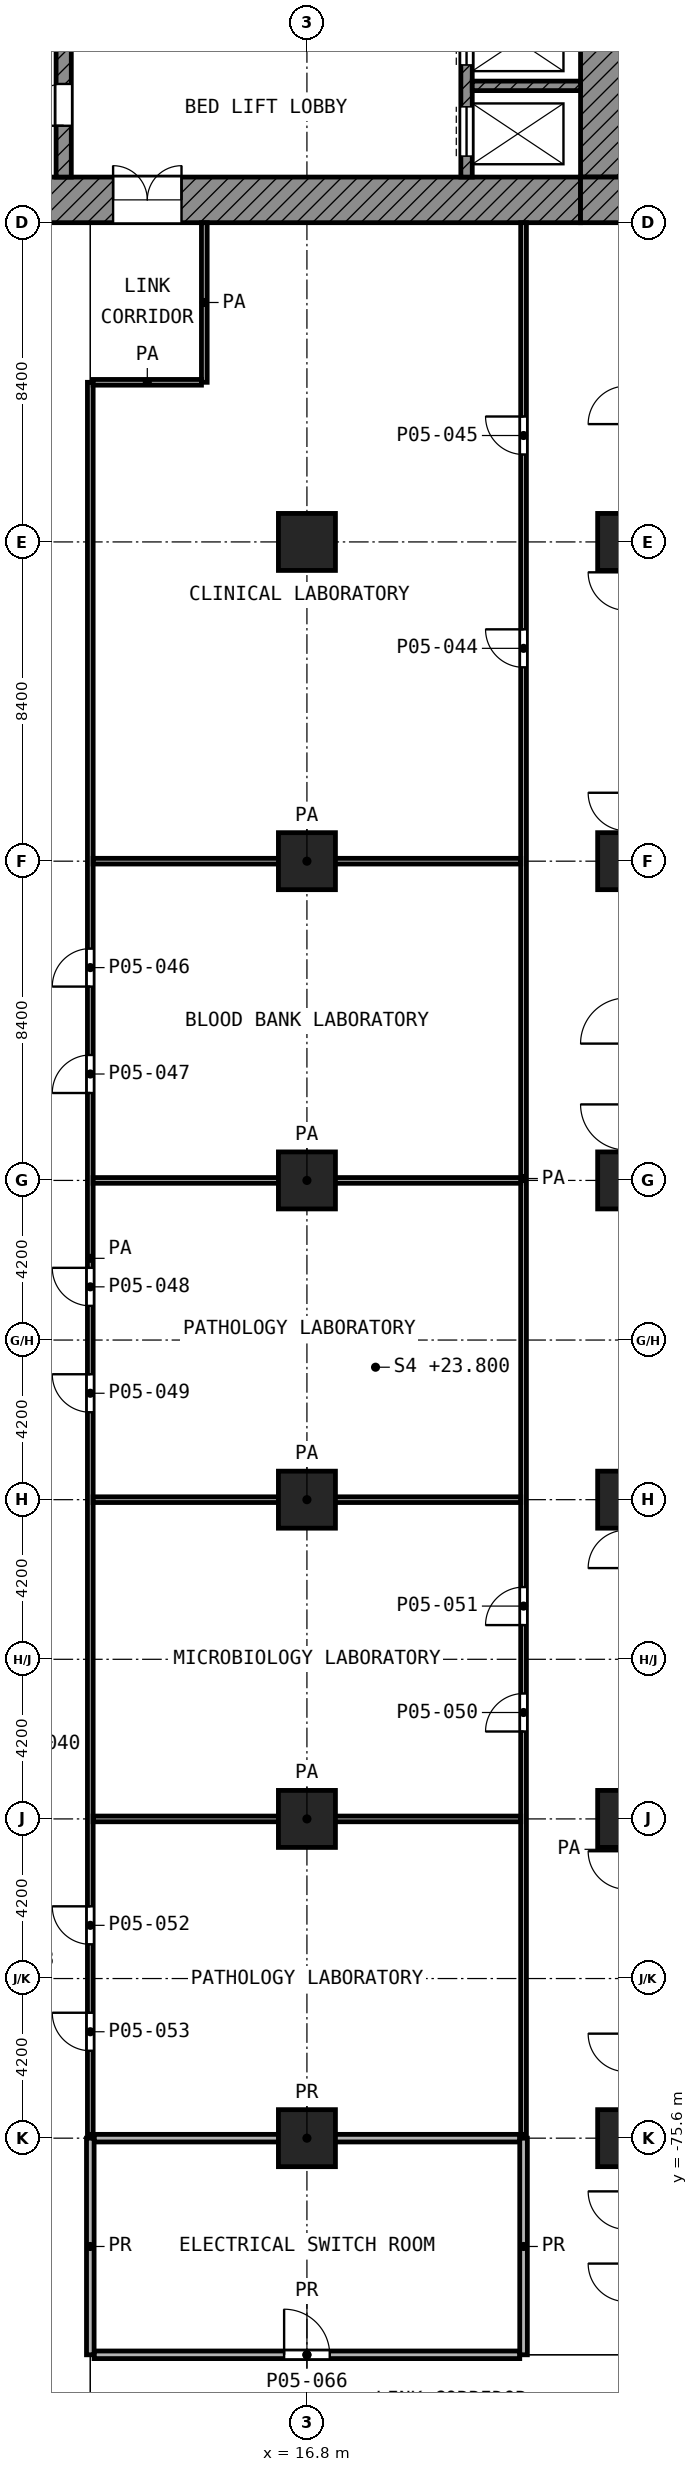
"""IFC4 building model, lengths in metres.
Left out: names, types, materials, properties, quantities, classifications, styles, units other than length and angle.
Written with IfcOpenShell. Run it as: python <this file> out.ifc"""

import sys

from ifc_helpers import new_model, si_unit, direction, frame, frame_2d, origin, origin_2d, place, context, subcontext, project, spatial, rectangle, extrude, element, fill, save


model = new_model("IFC4")
c1 = context("Model", 3, precision=1e-05, world=origin(), true_north=direction((0.0, 1.0)))
c2 = subcontext(c1, "Body", "Model", "MODEL_VIEW")
j1 = project(units=[si_unit("LENGTHUNIT", "METRE"), si_unit("PLANEANGLEUNIT", "RADIAN")], contexts=[c1])
p1 = place(None, origin())
s1 = spatial("IfcSite", under=j1, at=p1, CompositionType="ELEMENT")
p2 = place(p1, origin())
s2 = spatial("IfcBuilding", under=s1, at=p2, CompositionType="ELEMENT")
p3 = place(p2, frame((0.0, 0.0, 23.8)))
s3 = spatial("IfcBuildingStorey", under=s2, at=p3, CompositionType="ELEMENT", Elevation=23.8)
for number, where, z_axis, x_axis in (
    (1, (16.8, -33.6, 0.0), (0.0, 0.0, 1.0), (1.0, 0.0, 0.0)),
    (2, (25.2, -33.6, 0.0), (0.0, 0.0, 1.0), (1.0, 0.0, 0.0)),
    (3, (16.8, -42.0, 0.0), (0.0, 0.0, 1.0), (1.0, 0.0, 0.0)),
    (4, (25.2, -42.0, 0.0), (0.0, 0.0, 1.0), (1.0, 0.0, 0.0)),
    (5, (16.8, -50.4, 0.0), (0.0, 0.0, 1.0), (1.0, 0.0, 0.0)),
    (6, (25.2, -50.4, 0.0), (0.0, 0.0, 1.0), (1.0, 0.0, 0.0)),
    (7, (16.8, -58.8, 0.0), (0.0, 0.0, 1.0), (1.0, 0.0, 0.0)),
    (8, (25.2, -58.8, 0.0), (0.0, 0.0, 1.0), (1.0, 0.0, 0.0)),
    (9, (16.8, -67.2, 0.0), (0.0, 0.0, 1.0), (1.0, 0.0, 0.0)),
    (10, (25.2, -67.2, 0.0), (0.0, 0.0, 1.0), (1.0, 0.0, 0.0)),
    (11, (16.8, -75.6, 0.0), (0.0, 0.0, 1.0), (1.0, 0.0, 0.0)),
    (12, (25.2, -75.6, 0.0), (0.0, 0.0, 1.0), (1.0, 0.0, 0.0)),
):
    element("IfcColumn", number, at=place(p3, frame(where, z_axis=z_axis, x_axis=x_axis)), inside=s3, PredefinedType="COLUMN", context=c2, shape_type="SweptSolid", body=[
        extrude(rectangle(XDim=1.5, YDim=1.5, at=origin_2d()), origin(), (0.0, 0.0, 1.0), 5.2),
    ])
p4 = place(p3, frame((24.6, -24.0, 0.0), z_axis=(0.0, 0.0, 1.0), x_axis=(0.0, 1.0, 0.0)))
e13 = element("IfcWall", 13, at=p4, inside=s3, PredefinedType="SHEAR", context=c2, shape_type="SweptSolid", body=[
    extrude(rectangle(XDim=18.6, YDim=1.2, at=frame_2d((9.3, 0.0))), origin(), (0.0, 0.0, 1.0), 4.85),
])
p5 = place(p4, frame((10.5, 0.0, 0.0)))
e14 = element("IfcOpeningElement", 14, at=p5, cuts=e13, PredefinedType="OPENING", context=c2, shape_type="SweptSolid", body=[
    extrude(rectangle(XDim=1.8, YDim=2.1, at=frame_2d((0.9, 1.05))), frame((0.0, 0.61, 0.0), z_axis=(0.0, -1.0, 0.0), x_axis=(1.0, 0.0, 0.0)), (0.0, 0.0, 1.0), 1.22),
])
p6 = place(p3, frame((5.4, -24.6, 0.0), z_axis=(0.0, 0.0, 1.0), x_axis=(1.0, 0.0, 0.0)))
e15 = element("IfcWall", 15, at=p6, inside=s3, PredefinedType="SHEAR", context=c2, shape_type="SweptSolid", body=[
    extrude(rectangle(XDim=18.6, YDim=1.2, at=frame_2d((9.3, 0.0))), origin(), (0.0, 0.0, 1.0), 4.85),
])
p7 = place(p6, frame((6.3, 0.0, 0.0)))
e16 = element("IfcOpeningElement", 16, at=p7, cuts=e15, PredefinedType="OPENING", context=c2, shape_type="SweptSolid", body=[
    extrude(rectangle(XDim=1.8, YDim=2.1, at=frame_2d((0.9, 1.05))), frame((0.0, 0.61, 0.0), z_axis=(0.0, -1.0, 0.0), x_axis=(1.0, 0.0, 0.0)), (0.0, 0.0, 1.0), 1.22),
])
p8 = place(p3, frame((24.6, -25.2, 0.0), z_axis=(0.0, 0.0, 1.0), x_axis=(0.0, 1.0, 0.0)))
e17 = element("IfcWall", 17, at=p8, inside=s3, PredefinedType="SHEAR", context=c2, shape_type="SweptSolid", body=[
    extrude(rectangle(XDim=1.2, YDim=1.2, at=frame_2d((0.6, 0.0))), origin(), (0.0, 0.0, 1.0), 4.85),
])
p9 = place(p3, frame((10.4, -24.0, 0.0), z_axis=(0.0, 0.0, 1.0), x_axis=(0.0, 1.0, 0.0)))
e18 = element("IfcWall", 18, at=p9, inside=s3, PredefinedType="SHEAR", context=c2, shape_type="SweptSolid", body=[
    extrude(rectangle(XDim=3.65, YDim=0.4, at=frame_2d((1.825, 0.0))), origin(), (0.0, 0.0, 1.0), 4.85),
])
p10 = place(p9, frame((1.35, 0.0, 0.0)))
e19 = element("IfcOpeningElement", 19, at=p10, cuts=e18, PredefinedType="OPENING", context=c2, shape_type="SweptSolid", body=[
    extrude(rectangle(XDim=1.1, YDim=2.1, at=frame_2d((0.55, 1.05))), frame((0.0, 0.21, 0.0), z_axis=(0.0, -1.0, 0.0), x_axis=(1.0, 0.0, 0.0)), (0.0, 0.0, 1.0), 0.42),
])
p11 = place(p3, frame((21.0, -24.0, 0.0), z_axis=(0.0, 0.0, 1.0), x_axis=(0.0, 1.0, 0.0)))
e20 = element("IfcWall", 20, at=p11, inside=s3, PredefinedType="SHEAR", context=c2, shape_type="SweptSolid", body=[
    extrude(rectangle(XDim=4.95, YDim=0.3, at=frame_2d((2.475, 0.0))), origin(), (0.0, 0.0, 1.0), 4.85),
])
p12 = place(p11, frame((2.95, 0.0, 0.0)))
e21 = element("IfcOpeningElement", 21, at=p12, cuts=e20, PredefinedType="OPENING", context=c2, shape_type="SweptSolid", body=[
    extrude(rectangle(XDim=1.3, YDim=2.1, at=frame_2d((0.65, 1.05))), frame((0.0, 0.16, 0.0), z_axis=(0.0, -1.0, 0.0), x_axis=(1.0, 0.0, 0.0)), (0.0, 0.0, 1.0), 0.32),
])
p13 = place(p11, frame((0.55, 0.0, 0.0)))
e22 = element("IfcOpeningElement", 22, at=p13, cuts=e20, PredefinedType="OPENING", context=c2, shape_type="SweptSolid", body=[
    extrude(rectangle(XDim=1.3, YDim=2.1, at=frame_2d((0.65, 1.05))), frame((0.0, 0.16, 0.0), z_axis=(0.0, -1.0, 0.0), x_axis=(1.0, 0.0, 0.0)), (0.0, 0.0, 1.0), 0.32),
])
p14 = place(p3, frame((21.15, -21.6, 0.0), z_axis=(0.0, 0.0, 1.0), x_axis=(1.0, 0.0, 0.0)))
e23 = element("IfcWall", 23, at=p14, inside=s3, PredefinedType="SHEAR", context=c2, shape_type="SweptSolid", body=[
    extrude(rectangle(XDim=2.85, YDim=0.25, at=frame_2d((1.425, 0.0))), origin(), (0.0, 0.0, 1.0), 4.85),
])
for number, where, z_axis, x_axis in (
    (24, (11.175, -67.2, 0.0), (0.0, 0.0, 1.0), (1.0, 0.0, 0.0)),
    (25, (11.175, -58.8, 0.0), (0.0, 0.0, 1.0), (1.0, 0.0, 0.0)),
    (26, (11.175, -50.4, 0.0), (0.0, 0.0, 1.0), (1.0, 0.0, 0.0)),
    (27, (11.175, -42.0, 0.0), (0.0, 0.0, 1.0), (1.0, 0.0, 0.0)),
):
    element("IfcWall", number, at=place(p3, frame(where, z_axis=z_axis, x_axis=x_axis)), inside=s3, PredefinedType="PARTITIONING", context=c2, shape_type="SweptSolid", body=[
        extrude(rectangle(XDim=11.25, YDim=0.15, at=frame_2d((5.625, 0.0))), origin(), (0.0, 0.0, 1.0), 4.85),
    ])
p15 = place(p3, frame((11.175, -29.4, 0.0), z_axis=(0.0, 0.0, 1.0), x_axis=(1.0, 0.0, 0.0)))
e28 = element("IfcWall", 28, at=p15, inside=s3, PredefinedType="PARTITIONING", context=c2, shape_type="SweptSolid", body=[
    extrude(rectangle(XDim=2.85, YDim=0.15, at=frame_2d((1.425, 0.0))), origin(), (0.0, 0.0, 1.0), 4.85),
])
p16 = place(p3, frame((11.1, -75.5, 0.0), z_axis=(0.0, 0.0, 1.0), x_axis=(0.0, 1.0, 0.0)))
e29 = element("IfcWall", 29, at=p16, inside=s3, PredefinedType="PARTITIONING", context=c2, shape_type="SweptSolid", body=[
    extrude(rectangle(XDim=46.1, YDim=0.15, at=frame_2d((23.05, 0.0))), origin(), (0.0, 0.0, 1.0), 4.85),
])
p17 = place(p16, frame((30.2, 0.0, 0.0)))
e30 = element("IfcOpeningElement", 30, at=p17, cuts=e29, PredefinedType="OPENING", context=c2, shape_type="SweptSolid", body=[
    extrude(rectangle(XDim=1.0, YDim=2.1, at=frame_2d((0.5, 1.05))), frame((0.0, 0.085, 0.0), z_axis=(0.0, -1.0, 0.0), x_axis=(1.0, 0.0, 0.0)), (0.0, 0.0, 1.0), 0.17),
])
p18 = place(p16, frame((27.4, 0.0, 0.0)))
e31 = element("IfcOpeningElement", 31, at=p18, cuts=e29, PredefinedType="OPENING", context=c2, shape_type="SweptSolid", body=[
    extrude(rectangle(XDim=1.0, YDim=2.1, at=frame_2d((0.5, 1.05))), frame((0.0, 0.085, 0.0), z_axis=(0.0, -1.0, 0.0), x_axis=(1.0, 0.0, 0.0)), (0.0, 0.0, 1.0), 0.17),
])
p19 = place(p16, frame((21.8, 0.0, 0.0)))
e32 = element("IfcOpeningElement", 32, at=p19, cuts=e29, PredefinedType="OPENING", context=c2, shape_type="SweptSolid", body=[
    extrude(rectangle(XDim=1.0, YDim=2.1, at=frame_2d((0.5, 1.05))), frame((0.0, 0.085, 0.0), z_axis=(0.0, -1.0, 0.0), x_axis=(1.0, 0.0, 0.0)), (0.0, 0.0, 1.0), 0.17),
])
p20 = place(p16, frame((19.0, 0.0, 0.0)))
e33 = element("IfcOpeningElement", 33, at=p20, cuts=e29, PredefinedType="OPENING", context=c2, shape_type="SweptSolid", body=[
    extrude(rectangle(XDim=1.0, YDim=2.1, at=frame_2d((0.5, 1.05))), frame((0.0, 0.085, 0.0), z_axis=(0.0, -1.0, 0.0), x_axis=(1.0, 0.0, 0.0)), (0.0, 0.0, 1.0), 0.17),
])
p21 = place(p16, frame((5.0, 0.0, 0.0)))
e34 = element("IfcOpeningElement", 34, at=p21, cuts=e29, PredefinedType="OPENING", context=c2, shape_type="SweptSolid", body=[
    extrude(rectangle(XDim=1.0, YDim=2.1, at=frame_2d((0.5, 1.05))), frame((0.0, 0.085, 0.0), z_axis=(0.0, -1.0, 0.0), x_axis=(1.0, 0.0, 0.0)), (0.0, 0.0, 1.0), 0.17),
])
p22 = place(p16, frame((2.2, 0.0, 0.0)))
e35 = element("IfcOpeningElement", 35, at=p22, cuts=e29, PredefinedType="OPENING", context=c2, shape_type="SweptSolid", body=[
    extrude(rectangle(XDim=1.0, YDim=2.1, at=frame_2d((0.5, 1.05))), frame((0.0, 0.085, 0.0), z_axis=(0.0, -1.0, 0.0), x_axis=(1.0, 0.0, 0.0)), (0.0, 0.0, 1.0), 0.17),
])
p23 = place(p3, frame((14.1, -29.4, 0.0), z_axis=(0.0, 0.0, 1.0), x_axis=(0.0, 1.0, 0.0)))
e36 = element("IfcWall", 36, at=p23, inside=s3, PredefinedType="PARTITIONING", context=c2, shape_type="SweptSolid", body=[
    extrude(rectangle(XDim=4.2, YDim=0.15, at=frame_2d((2.1, 0.0))), origin(), (0.0, 0.0, 1.0), 4.85),
])
p24 = place(p3, frame((22.5, -75.5, 0.0), z_axis=(0.0, 0.0, 1.0), x_axis=(0.0, 1.0, 0.0)))
e37 = element("IfcWall", 37, at=p24, inside=s3, PredefinedType="PARTITIONING", context=c2, shape_type="SweptSolid", body=[
    extrude(rectangle(XDim=50.3, YDim=0.15, at=frame_2d((25.15, 0.0))), origin(), (0.0, 0.0, 1.0), 4.85),
])
p25 = place(p24, frame((38.6, 0.0, 0.0)))
e38 = element("IfcOpeningElement", 38, at=p25, cuts=e37, PredefinedType="OPENING", context=c2, shape_type="SweptSolid", body=[
    extrude(rectangle(XDim=1.0, YDim=2.1, at=frame_2d((0.5, 1.05))), frame((0.0, 0.085, 0.0), z_axis=(0.0, -1.0, 0.0), x_axis=(1.0, 0.0, 0.0)), (0.0, 0.0, 1.0), 0.17),
])
p26 = place(p24, frame((44.2, 0.0, 0.0)))
e39 = element("IfcOpeningElement", 39, at=p26, cuts=e37, PredefinedType="OPENING", context=c2, shape_type="SweptSolid", body=[
    extrude(rectangle(XDim=1.0, YDim=2.1, at=frame_2d((0.5, 1.05))), frame((0.0, 0.085, 0.0), z_axis=(0.0, -1.0, 0.0), x_axis=(1.0, 0.0, 0.0)), (0.0, 0.0, 1.0), 0.17),
])
p27 = place(p24, frame((10.6, 0.0, 0.0)))
e40 = element("IfcOpeningElement", 40, at=p27, cuts=e37, PredefinedType="OPENING", context=c2, shape_type="SweptSolid", body=[
    extrude(rectangle(XDim=1.0, YDim=2.1, at=frame_2d((0.5, 1.05))), frame((0.0, 0.085, 0.0), z_axis=(0.0, -1.0, 0.0), x_axis=(1.0, 0.0, 0.0)), (0.0, 0.0, 1.0), 0.17),
])
p28 = place(p24, frame((13.4, 0.0, 0.0)))
e41 = element("IfcOpeningElement", 41, at=p28, cuts=e37, PredefinedType="OPENING", context=c2, shape_type="SweptSolid", body=[
    extrude(rectangle(XDim=1.0, YDim=2.1, at=frame_2d((0.5, 1.05))), frame((0.0, 0.085, 0.0), z_axis=(0.0, -1.0, 0.0), x_axis=(1.0, 0.0, 0.0)), (0.0, 0.0, 1.0), 0.17),
])
p29 = place(p3, frame((11.2, -81.3, 0.0), z_axis=(0.0, 0.0, 1.0), x_axis=(1.0, 0.0, 0.0)))
e42 = element("IfcWall", 42, at=p29, inside=s3, PredefinedType="PARTITIONING", context=c2, shape_type="SweptSolid", body=[
    extrude(rectangle(XDim=11.2, YDim=0.2, at=frame_2d((5.6, 0.0))), origin(), (0.0, 0.0, 1.0), 4.85),
])
p30 = place(p29, frame((5.0, 0.0, 0.0)))
e43 = element("IfcOpeningElement", 43, at=p30, cuts=e42, PredefinedType="OPENING", context=c2, shape_type="SweptSolid", body=[
    extrude(rectangle(XDim=1.2, YDim=2.1, at=frame_2d((0.6, 1.05))), frame((0.0, 0.11, 0.0), z_axis=(0.0, -1.0, 0.0), x_axis=(1.0, 0.0, 0.0)), (0.0, 0.0, 1.0), 0.22),
])
p31 = place(p3, frame((11.2, -75.6, 0.0), z_axis=(0.0, 0.0, 1.0), x_axis=(1.0, 0.0, 0.0)))
e44 = element("IfcWall", 44, at=p31, inside=s3, PredefinedType="PARTITIONING", context=c2, shape_type="SweptSolid", body=[
    extrude(rectangle(XDim=11.2, YDim=0.2, at=frame_2d((5.6, 0.0))), origin(), (0.0, 0.0, 1.0), 4.85),
])
for number, where, z_axis, x_axis in (
    (45, (11.1, -81.3, 0.0), (0.0, 0.0, 1.0), (0.0, 1.0, 0.0)),
    (46, (22.5, -81.3, 0.0), (0.0, 0.0, 1.0), (0.0, 1.0, 0.0)),
):
    element("IfcWall", number, at=place(p3, frame(where, z_axis=z_axis, x_axis=x_axis)), inside=s3, PredefinedType="PARTITIONING", context=c2, shape_type="SweptSolid", body=[
        extrude(rectangle(XDim=5.7, YDim=0.2, at=frame_2d((2.85, 0.0))), origin(), (0.0, 0.0, 1.0), 4.85),
    ])
p32 = place(p12, origin())
e47 = element("IfcDoor", 47, at=p32, inside=s3, OperationType="DOUBLE_DOOR_SLIDING", PredefinedType="DOOR", context=c2, shape_type="SweptSolid", body=[
    extrude(rectangle(XDim=1.3, YDim=2.1, at=frame_2d((0.65, 1.05))), frame((0.0, 0.025, 0.0), z_axis=(0.0, -1.0, 0.0), x_axis=(1.0, 0.0, 0.0)), (0.0, 0.0, 1.0), 0.05),
])
fill(e21, e47)
p33 = place(p13, origin())
e48 = element("IfcDoor", 48, at=p33, inside=s3, OperationType="DOUBLE_DOOR_SLIDING", PredefinedType="DOOR", context=c2, shape_type="SweptSolid", body=[
    extrude(rectangle(XDim=1.3, YDim=2.1, at=frame_2d((0.65, 1.05))), frame((0.0, 0.025, 0.0), z_axis=(0.0, -1.0, 0.0), x_axis=(1.0, 0.0, 0.0)), (0.0, 0.0, 1.0), 0.05),
])
fill(e22, e48)
p34 = place(p10, origin())
e49 = element("IfcDoor", 49, at=p34, inside=s3, OperationType="SINGLE_SWING_LEFT", PredefinedType="DOOR", context=c2, shape_type="SweptSolid", body=[
    extrude(rectangle(XDim=1.1, YDim=2.1, at=frame_2d((0.55, 1.05))), frame((0.0, 0.025, 0.0), z_axis=(0.0, -1.0, 0.0), x_axis=(1.0, 0.0, 0.0)), (0.0, 0.0, 1.0), 0.05),
])
fill(e19, e49)
p35 = place(p7, origin())
e50 = element("IfcDoor", 50, at=p35, inside=s3, OperationType="DOUBLE_DOOR_SINGLE_SWING", PredefinedType="DOOR", context=c2, shape_type="SweptSolid", body=[
    extrude(rectangle(XDim=1.8, YDim=2.1, at=frame_2d((0.9, 1.05))), frame((0.0, 0.025, 0.0), z_axis=(0.0, -1.0, 0.0), x_axis=(1.0, 0.0, 0.0)), (0.0, 0.0, 1.0), 0.05),
])
fill(e16, e50)
p36 = place(p25, origin())
e51 = element("IfcDoor", 51, at=p36, inside=s3, OperationType="SINGLE_SWING_RIGHT", PredefinedType="DOOR", context=c2, shape_type="SweptSolid", body=[
    extrude(rectangle(XDim=1.0, YDim=2.1, at=frame_2d((0.5, 1.05))), frame((0.0, 0.025, 0.0), z_axis=(0.0, -1.0, 0.0), x_axis=(1.0, 0.0, 0.0)), (0.0, 0.0, 1.0), 0.05),
])
fill(e38, e51)
p37 = place(p26, origin())
e52 = element("IfcDoor", 52, at=p37, inside=s3, OperationType="SINGLE_SWING_RIGHT", PredefinedType="DOOR", context=c2, shape_type="SweptSolid", body=[
    extrude(rectangle(XDim=1.0, YDim=2.1, at=frame_2d((0.5, 1.05))), frame((0.0, 0.025, 0.0), z_axis=(0.0, -1.0, 0.0), x_axis=(1.0, 0.0, 0.0)), (0.0, 0.0, 1.0), 0.05),
])
fill(e39, e52)
p38 = place(p17, origin())
e53 = element("IfcDoor", 53, at=p38, inside=s3, OperationType="SINGLE_SWING_LEFT", PredefinedType="DOOR", context=c2, shape_type="SweptSolid", body=[
    extrude(rectangle(XDim=1.0, YDim=2.1, at=frame_2d((0.5, 1.05))), frame((0.0, 0.025, 0.0), z_axis=(0.0, -1.0, 0.0), x_axis=(1.0, 0.0, 0.0)), (0.0, 0.0, 1.0), 0.05),
])
fill(e30, e53)
p39 = place(p18, origin())
e54 = element("IfcDoor", 54, at=p39, inside=s3, OperationType="SINGLE_SWING_LEFT", PredefinedType="DOOR", context=c2, shape_type="SweptSolid", body=[
    extrude(rectangle(XDim=1.0, YDim=2.1, at=frame_2d((0.5, 1.05))), frame((0.0, 0.025, 0.0), z_axis=(0.0, -1.0, 0.0), x_axis=(1.0, 0.0, 0.0)), (0.0, 0.0, 1.0), 0.05),
])
fill(e31, e54)
p40 = place(p19, origin())
e55 = element("IfcDoor", 55, at=p40, inside=s3, OperationType="SINGLE_SWING_RIGHT", PredefinedType="DOOR", context=c2, shape_type="SweptSolid", body=[
    extrude(rectangle(XDim=1.0, YDim=2.1, at=frame_2d((0.5, 1.05))), frame((0.0, 0.025, 0.0), z_axis=(0.0, -1.0, 0.0), x_axis=(1.0, 0.0, 0.0)), (0.0, 0.0, 1.0), 0.05),
])
fill(e32, e55)
p41 = place(p20, origin())
e56 = element("IfcDoor", 56, at=p41, inside=s3, OperationType="SINGLE_SWING_RIGHT", PredefinedType="DOOR", context=c2, shape_type="SweptSolid", body=[
    extrude(rectangle(XDim=1.0, YDim=2.1, at=frame_2d((0.5, 1.05))), frame((0.0, 0.025, 0.0), z_axis=(0.0, -1.0, 0.0), x_axis=(1.0, 0.0, 0.0)), (0.0, 0.0, 1.0), 0.05),
])
fill(e33, e56)
p42 = place(p27, origin())
e57 = element("IfcDoor", 57, at=p42, inside=s3, OperationType="SINGLE_SWING_LEFT", PredefinedType="DOOR", context=c2, shape_type="SweptSolid", body=[
    extrude(rectangle(XDim=1.0, YDim=2.1, at=frame_2d((0.5, 1.05))), frame((0.0, 0.025, 0.0), z_axis=(0.0, -1.0, 0.0), x_axis=(1.0, 0.0, 0.0)), (0.0, 0.0, 1.0), 0.05),
])
fill(e40, e57)
p43 = place(p28, origin())
e58 = element("IfcDoor", 58, at=p43, inside=s3, OperationType="SINGLE_SWING_LEFT", PredefinedType="DOOR", context=c2, shape_type="SweptSolid", body=[
    extrude(rectangle(XDim=1.0, YDim=2.1, at=frame_2d((0.5, 1.05))), frame((0.0, 0.025, 0.0), z_axis=(0.0, -1.0, 0.0), x_axis=(1.0, 0.0, 0.0)), (0.0, 0.0, 1.0), 0.05),
])
fill(e41, e58)
p44 = place(p21, origin())
e59 = element("IfcDoor", 59, at=p44, inside=s3, OperationType="SINGLE_SWING_RIGHT", PredefinedType="DOOR", context=c2, shape_type="SweptSolid", body=[
    extrude(rectangle(XDim=1.0, YDim=2.1, at=frame_2d((0.5, 1.05))), frame((0.0, 0.025, 0.0), z_axis=(0.0, -1.0, 0.0), x_axis=(1.0, 0.0, 0.0)), (0.0, 0.0, 1.0), 0.05),
])
fill(e34, e59)
p45 = place(p22, origin())
e60 = element("IfcDoor", 60, at=p45, inside=s3, OperationType="SINGLE_SWING_RIGHT", PredefinedType="DOOR", context=c2, shape_type="SweptSolid", body=[
    extrude(rectangle(XDim=1.0, YDim=2.1, at=frame_2d((0.5, 1.05))), frame((0.0, 0.025, 0.0), z_axis=(0.0, -1.0, 0.0), x_axis=(1.0, 0.0, 0.0)), (0.0, 0.0, 1.0), 0.05),
])
fill(e35, e60)
p46 = place(p30, origin())
e61 = element("IfcDoor", 61, at=p46, inside=s3, OperationType="SINGLE_SWING_LEFT", PredefinedType="DOOR", context=c2, shape_type="SweptSolid", body=[
    extrude(rectangle(XDim=1.2, YDim=2.1, at=frame_2d((0.6, 1.05))), frame((0.0, 0.025, 0.0), z_axis=(0.0, -1.0, 0.0), x_axis=(1.0, 0.0, 0.0)), (0.0, 0.0, 1.0), 0.05),
])
fill(e43, e61)
save(model, sys.argv[1])
